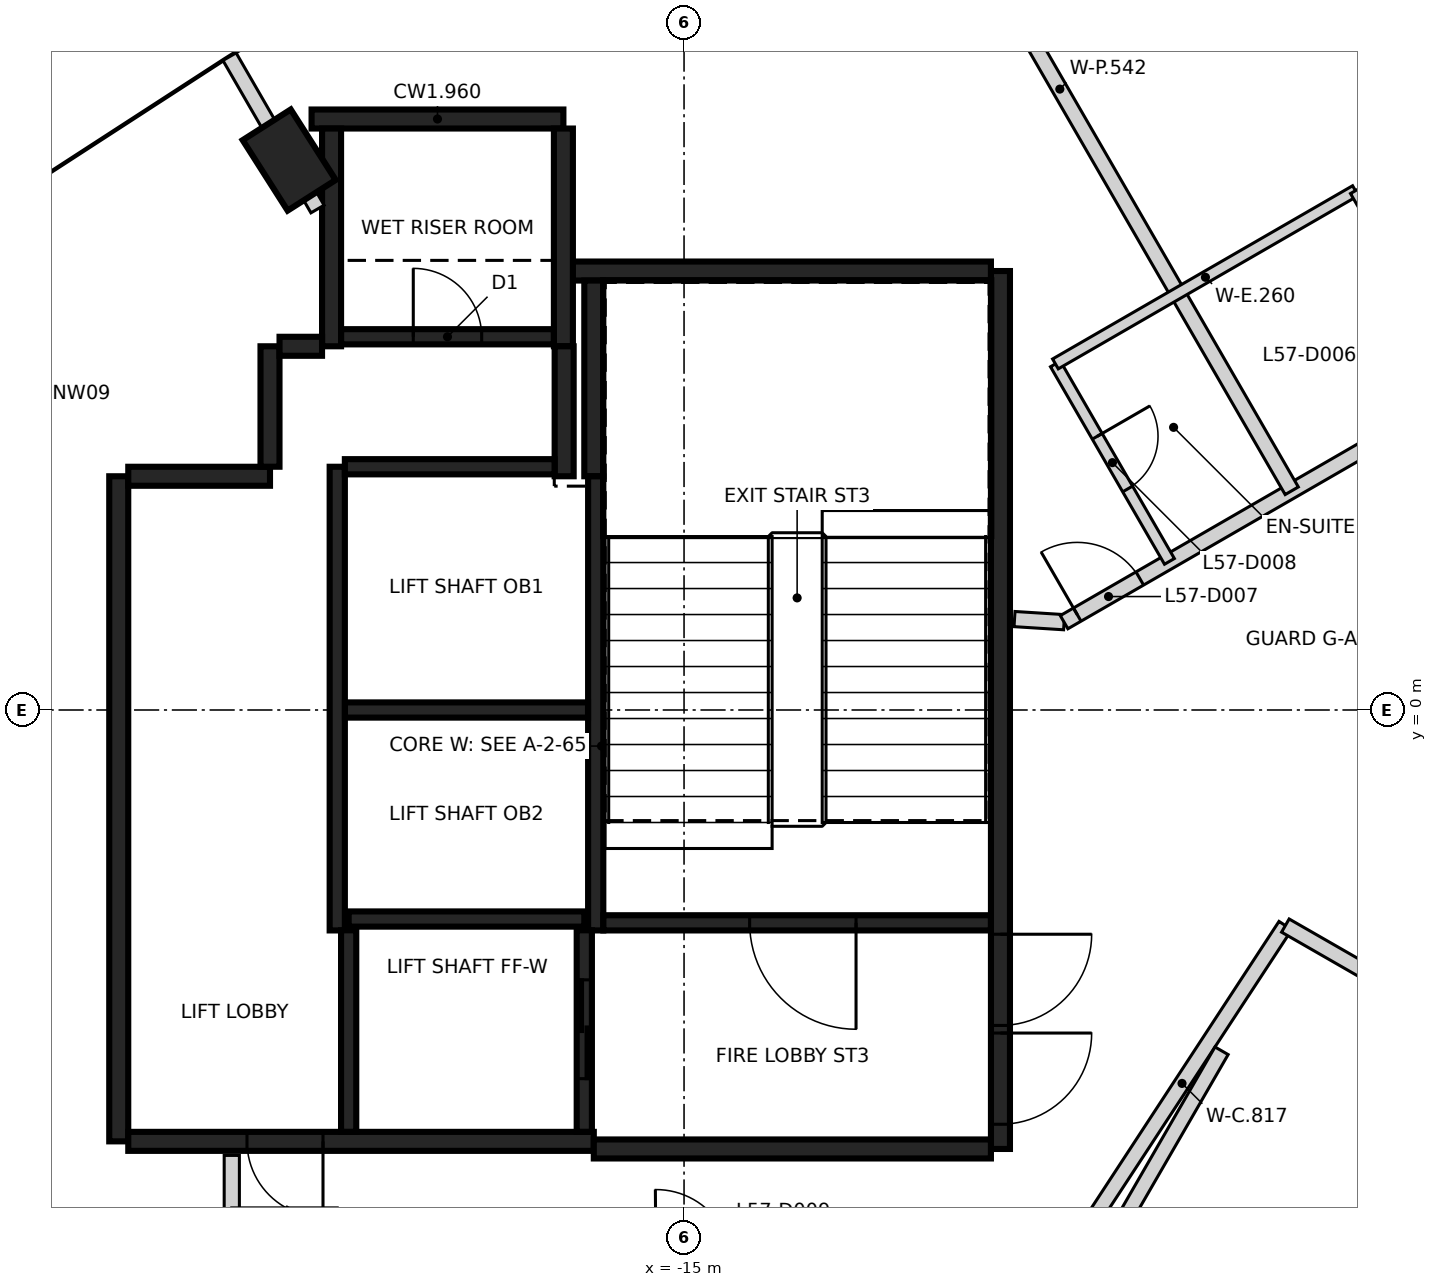
"""IFC4 building model, lengths in metres.
Left out: names, types, materials, properties, quantities, classifications, styles, units other than length and angle.
Written with IfcOpenShell. Run it as: python <this file> out.ifc"""

import sys

from ifc_helpers import new_model, si_unit, direction, frame, frame_2d, origin, origin_2d, place, context, subcontext, project, spatial, rectangle, extrude, element, fill, save


model = new_model("IFC4")
c1 = context("Model", 3, precision=1e-05, world=origin(), true_north=direction((0.0, 1.0)))
c2 = subcontext(c1, "Body", "Model", "MODEL_VIEW")
j1 = project(units=[si_unit("LENGTHUNIT", "METRE"), si_unit("PLANEANGLEUNIT", "RADIAN")], contexts=[c1])
p1 = place(None, origin())
s1 = spatial("IfcSite", under=j1, at=p1, CompositionType="ELEMENT")
p2 = place(p1, origin())
s2 = spatial("IfcBuilding", under=s1, at=p2, CompositionType="ELEMENT")
p3 = place(p2, frame((0.0, 0.0, 228.6)))
s3 = spatial("IfcBuildingStorey", under=s2, at=p3, CompositionType="ELEMENT", Elevation=228.6)
p4 = place(p3, frame((-20.195, 7.235, -0.35), z_axis=(0.0, 0.0, 1.0), x_axis=(-0.537585144719, 0.843209471114, 0.0)))
e1 = element("IfcColumn", 1, at=p4, inside=s3, PredefinedType="COLUMN", context=c2, shape_type="SweptSolid", body=[
    extrude(rectangle(XDim=1.1, YDim=0.75, at=origin_2d()), origin(), (0.0, 0.0, 1.0), 3.6),
])
p5 = place(p3, frame((-10.837, 5.775, 0.0), z_axis=(0.0, 0.0, 1.0), x_axis=(0.0, -1.0, 0.0)))
e2 = element("IfcWall", 2, at=p5, inside=s3, PredefinedType="SHEAR", context=c2, shape_type="SweptSolid", body=[
    extrude(rectangle(XDim=11.55, YDim=0.25, at=frame_2d((5.775, 0.0))), origin(), (0.0, 0.0, 1.0), 3.25),
])
p6 = place(p5, frame((10.025, 0.0, 0.0)))
e3 = element("IfcOpeningElement", 3, at=p6, cuts=e2, PredefinedType="OPENING", context=c2, shape_type="SweptSolid", body=[
    extrude(rectangle(XDim=1.2, YDim=2.1, at=frame_2d((0.6, 1.05))), frame((0.0, 0.135, 0.0), z_axis=(0.0, -1.0, 0.0), x_axis=(1.0, 0.0, 0.0)), (0.0, 0.0, 1.0), 0.27),
])
p7 = place(p5, frame((8.725, 0.0, 0.0)))
e4 = element("IfcOpeningElement", 4, at=p7, cuts=e2, PredefinedType="OPENING", context=c2, shape_type="SweptSolid", body=[
    extrude(rectangle(XDim=1.2, YDim=2.1, at=frame_2d((0.6, 1.05))), frame((0.0, 0.135, 0.0), z_axis=(0.0, -1.0, 0.0), x_axis=(1.0, 0.0, 0.0)), (0.0, 0.0, 1.0), 0.27),
])
p8 = place(p3, frame((-22.437, -5.675, 0.0), z_axis=(0.0, 0.0, 1.0), x_axis=(0.0, 1.0, 0.0)))
e5 = element("IfcWall", 5, at=p8, inside=s3, PredefinedType="SHEAR", context=c2, shape_type="SweptSolid", body=[
    extrude(rectangle(XDim=8.75, YDim=0.25, at=frame_2d((4.375, 0.0))), origin(), (0.0, 0.0, 1.0), 3.25),
])
p9 = place(p3, frame((-16.187, -5.675, 0.0), z_axis=(0.0, 0.0, 1.0), x_axis=(-1.0, 0.0, 0.0)))
e6 = element("IfcWall", 6, at=p9, inside=s3, PredefinedType="SHEAR", context=c2, shape_type="SweptSolid", body=[
    extrude(rectangle(XDim=6.125, YDim=0.25, at=frame_2d((3.062, 0.0))), origin(), (0.0, 0.0, 1.0), 3.25),
])
p10 = place(p9, frame((3.563, 0.0, 0.0)))
e7 = element("IfcOpeningElement", 7, at=p10, cuts=e6, PredefinedType="OPENING", context=c2, shape_type="SweptSolid", body=[
    extrude(rectangle(XDim=1.0, YDim=2.1, at=frame_2d((0.5, 1.05))), frame((0.0, 0.135, 0.0), z_axis=(0.0, -1.0, 0.0), x_axis=(1.0, 0.0, 0.0)), (0.0, 0.0, 1.0), 0.27),
])
p11 = place(p3, frame((-10.963, -5.775, 0.0), z_axis=(0.0, 0.0, 1.0), x_axis=(-1.0, 0.0, 0.0)))
e8 = element("IfcWall", 8, at=p11, inside=s3, PredefinedType="SHEAR", context=c2, shape_type="SweptSolid", body=[
    extrude(rectangle(XDim=5.225, YDim=0.25, at=frame_2d((2.612, 0.0))), origin(), (0.0, 0.0, 1.0), 3.25),
])
p12 = place(p3, frame((-16.472, 5.775, 0.0), z_axis=(0.0, 0.0, 1.0), x_axis=(1.0, 0.0, 0.0)))
e9 = element("IfcWall", 9, at=p12, inside=s3, PredefinedType="SHEAR", context=c2, shape_type="SweptSolid", body=[
    extrude(rectangle(XDim=5.51, YDim=0.25, at=frame_2d((2.755, 0.0))), origin(), (0.0, 0.0, 1.0), 3.25),
])
p13 = place(p3, frame((-19.9, 7.775, 0.0), z_axis=(0.0, 0.0, 1.0), x_axis=(1.0, 0.0, 0.0)))
e10 = element("IfcWall", 10, at=p13, inside=s3, PredefinedType="SHEAR", context=c2, shape_type="SweptSolid", body=[
    extrude(rectangle(XDim=3.313, YDim=0.25, at=frame_2d((1.656, 0.0))), origin(), (0.0, 0.0, 1.0), 3.25),
])
for number, where, z_axis, x_axis in (
    (11, (-16.587, 7.65, 0.0), (0.0, 0.0, 1.0), (0.0, -1.0, 0.0)),
    (12, (-19.637, 4.785, 0.0), (0.0, 0.0, 1.0), (0.0, 1.0, 0.0)),
):
    element("IfcWall", number, at=place(p3, frame(where, z_axis=z_axis, x_axis=x_axis)), inside=s3, PredefinedType="SHEAR", context=c2, shape_type="SweptSolid", body=[
        extrude(rectangle(XDim=2.865, YDim=0.25, at=frame_2d((1.432, 0.0))), origin(), (0.0, 0.0, 1.0), 3.25),
    ])
p14 = place(p3, frame((-16.187, 3.075, 0.0), z_axis=(0.0, 0.0, 1.0), x_axis=(0.0, 1.0, 0.0)))
e13 = element("IfcWall", 13, at=p14, inside=s3, PredefinedType="SHEAR", context=c2, shape_type="SweptSolid", body=[
    extrude(rectangle(XDim=2.575, YDim=0.25, at=frame_2d((1.287, 0.0))), origin(), (0.0, 0.0, 1.0), 3.25),
])
p15 = place(p3, frame((-22.312, 3.075, 0.0), z_axis=(0.0, 0.0, 1.0), x_axis=(1.0, 0.0, 0.0)))
e14 = element("IfcWall", 14, at=p15, inside=s3, PredefinedType="SHEAR", context=c2, shape_type="SweptSolid", body=[
    extrude(rectangle(XDim=1.865, YDim=0.25, at=frame_2d((0.932, 0.0))), origin(), (0.0, 0.0, 1.0), 3.25),
])
p16 = place(p3, frame((-16.577, 4.785, 0.0), z_axis=(0.0, 0.0, 1.0), x_axis=(0.0, -1.0, 0.0)))
e15 = element("IfcWall", 15, at=p16, inside=s3, PredefinedType="SHEAR", context=c2, shape_type="SweptSolid", body=[
    extrude(rectangle(XDim=1.71, YDim=0.25, at=frame_2d((0.855, 0.0))), origin(), (0.0, 0.0, 1.0), 3.25),
])
p17 = place(p3, frame((-20.447, 3.2, 0.0), z_axis=(0.0, 0.0, 1.0), x_axis=(0.0, 1.0, 0.0)))
e16 = element("IfcWall", 16, at=p17, inside=s3, PredefinedType="SHEAR", context=c2, shape_type="SweptSolid", body=[
    extrude(rectangle(XDim=1.584, YDim=0.25, at=frame_2d((0.792, 0.0))), origin(), (0.0, 0.0, 1.0), 3.25),
])
p18 = place(p3, frame((-20.322, 4.785, 0.0), z_axis=(0.0, 0.0, 1.0), x_axis=(1.0, 0.0, 0.0)))
e17 = element("IfcWall", 17, at=p18, inside=s3, PredefinedType="SHEAR", context=c2, shape_type="SweptSolid", body=[
    extrude(rectangle(XDim=0.559, YDim=0.25, at=frame_2d((0.28, 0.0))), origin(), (0.0, 0.0, 1.0), 3.25),
])
p19 = place(p3, frame((-16.162, 3.074, 0.0), z_axis=(0.0, 0.0, 1.0), x_axis=(0.0, -1.0, 0.0)))
e18 = element("IfcWall", 18, at=p19, inside=s3, PredefinedType="SHEAR", context=c2, shape_type="SweptSolid", body=[
    extrude(rectangle(XDim=5.974, YDim=0.2, at=frame_2d((2.987, 0.0))), origin(), (0.0, 0.0, 1.0), 3.25),
])
p20 = place(p3, frame((-19.562, -2.9, 0.0), z_axis=(0.0, 0.0, 1.0), x_axis=(0.0, 1.0, 0.0)))
e19 = element("IfcWall", 19, at=p20, inside=s3, PredefinedType="SHEAR", context=c2, shape_type="SweptSolid", body=[
    extrude(rectangle(XDim=6.1, YDim=0.2, at=frame_2d((3.05, 0.0))), origin(), (0.0, 0.0, 1.0), 3.25),
])
p21 = place(p3, frame((-10.963, -2.8, 0.0), z_axis=(0.0, 0.0, 1.0), x_axis=(-1.0, 0.0, 0.0)))
e20 = element("IfcWall", 20, at=p21, inside=s3, PredefinedType="SHEAR", context=c2, shape_type="SweptSolid", body=[
    extrude(rectangle(XDim=5.098, YDim=0.2, at=frame_2d((2.549, 0.0))), origin(), (0.0, 0.0, 1.0), 3.25),
])
p22 = place(p21, frame((1.774, 0.0, 0.0)))
e21 = element("IfcOpeningElement", 21, at=p22, cuts=e20, PredefinedType="OPENING", context=c2, shape_type="SweptSolid", body=[
    extrude(rectangle(XDim=1.4, YDim=2.1, at=frame_2d((0.7, 1.05))), frame((0.0, 0.11, 0.0), z_axis=(0.0, -1.0, 0.0), x_axis=(1.0, 0.0, 0.0)), (0.0, 0.0, 1.0), 0.22),
])
p23 = place(p3, frame((-16.263, 0.0, 0.0), z_axis=(0.0, 0.0, 1.0), x_axis=(-1.0, 0.0, 0.0)))
e22 = element("IfcWall", 22, at=p23, inside=s3, PredefinedType="SHEAR", context=c2, shape_type="SweptSolid", body=[
    extrude(rectangle(XDim=3.198, YDim=0.2, at=frame_2d((1.599, 0.0))), origin(), (0.0, 0.0, 1.0), 3.25),
])
p24 = place(p3, frame((-19.511, 4.91, 0.0), z_axis=(0.0, 0.0, 1.0), x_axis=(1.0, 0.0, 0.0)))
e23 = element("IfcWall", 23, at=p24, inside=s3, PredefinedType="SHEAR", context=c2, shape_type="SweptSolid", body=[
    extrude(rectangle(XDim=2.798, YDim=0.2, at=frame_2d((1.399, 0.0))), origin(), (0.0, 0.0, 1.0), 3.25),
])
p25 = place(p24, frame((0.949, 0.0, 0.0)))
e24 = element("IfcOpeningElement", 24, at=p25, cuts=e23, PredefinedType="OPENING", context=c2, shape_type="SweptSolid", body=[
    extrude(rectangle(XDim=0.9, YDim=2.1, at=frame_2d((0.45, 1.05))), frame((0.0, 0.11, 0.0), z_axis=(0.0, -1.0, 0.0), x_axis=(1.0, 0.0, 0.0)), (0.0, 0.0, 1.0), 0.22),
])
p26 = place(p3, frame((-19.462, 3.2, 0.0), z_axis=(0.0, 0.0, 1.0), x_axis=(1.0, 0.0, 0.0)))
e25 = element("IfcWall", 25, at=p26, inside=s3, PredefinedType="SHEAR", context=c2, shape_type="SweptSolid", body=[
    extrude(rectangle(XDim=2.759, YDim=0.2, at=frame_2d((1.379, 0.0))), origin(), (0.0, 0.0, 1.0), 3.25),
])
p27 = place(p3, frame((-19.412, -2.75, 0.0), z_axis=(0.0, 0.0, 1.0), x_axis=(1.0, 0.0, 0.0)))
e26 = element("IfcWall", 26, at=p27, inside=s3, PredefinedType="SHEAR", context=c2, shape_type="SweptSolid", body=[
    extrude(rectangle(XDim=3.1, YDim=0.2, at=frame_2d((1.55, 0.0))), origin(), (0.0, 0.0, 1.0), 3.25),
])
p28 = place(p3, frame((-16.312, -2.898, 0.0), z_axis=(0.0, 0.0, 1.0), x_axis=(0.0, -1.0, 0.0)))
e27 = element("IfcWall", 27, at=p28, inside=s3, PredefinedType="SHEAR", context=c2, shape_type="SweptSolid", body=[
    extrude(rectangle(XDim=2.651, YDim=0.2, at=frame_2d((1.325, 0.0))), origin(), (0.0, 0.0, 1.0), 3.25),
])
p29 = place(p28, frame((0.652, 0.0, 0.0)))
e28 = element("IfcOpeningElement", 28, at=p29, cuts=e27, PredefinedType="OPENING", context=c2, shape_type="SweptSolid", body=[
    extrude(rectangle(XDim=1.3, YDim=2.1, at=frame_2d((0.65, 1.05))), frame((0.0, 0.11, 0.0), z_axis=(0.0, -1.0, 0.0), x_axis=(1.0, 0.0, 0.0)), (0.0, 0.0, 1.0), 0.22),
])
p30 = place(p3, frame((-19.412, -5.549, 0.0), z_axis=(0.0, 0.0, 1.0), x_axis=(0.0, 1.0, 0.0)))
e29 = element("IfcWall", 29, at=p30, inside=s3, PredefinedType="SHEAR", context=c2, shape_type="SweptSolid", body=[
    extrude(rectangle(XDim=2.651, YDim=0.2, at=frame_2d((1.325, 0.0))), origin(), (0.0, 0.0, 1.0), 3.25),
])
p31 = place(p3, frame((-20.95, -6.65, 0.0), z_axis=(0.0, 0.0, 1.0), x_axis=(0.0, 1.0, 0.0)))
e30 = element("IfcWall", 30, at=p31, inside=s3, PredefinedType="PARTITIONING", context=c2, shape_type="SweptSolid", body=[
    extrude(rectangle(XDim=0.79, YDim=0.2, at=frame_2d((0.395, 0.0))), origin(), (0.0, 0.0, 1.0), 2.35),
])
p32 = place(p3, frame((-20.95, -6.65, 0.0), z_axis=(0.0, 0.0, 1.0), x_axis=(1.0, 0.0, 0.0)))
e31 = element("IfcWall", 31, at=p32, inside=s3, PredefinedType="PARTITIONING", context=c2, shape_type="SweptSolid", body=[
    extrude(rectangle(XDim=1.387, YDim=0.2, at=frame_2d((0.693, 0.0))), origin(), (0.0, 0.0, 1.0), 2.35),
])
p33 = place(p3, frame((-10.652, 1.196, 0.0), z_axis=(0.0, 0.0, 1.0), x_axis=(0.998005794618, -0.063122372489, 0.0)))
e32 = element("IfcWall", 32, at=p33, inside=s3, PredefinedType="PARTITIONING", context=c2, shape_type="SweptSolid", body=[
    extrude(rectangle(XDim=0.654, YDim=0.2, at=frame_2d((0.327, 0.0))), origin(), (0.0, 0.0, 1.0), 3.25),
])
p34 = place(p3, frame((-10.0, 1.155, 0.0), z_axis=(0.0, 0.0, 1.0), x_axis=(0.866014095592, 0.500019585852, 0.0)))
e33 = element("IfcWall", 33, at=p34, inside=s3, PredefinedType="PARTITIONING", context=c2, shape_type="SweptSolid", body=[
    extrude(rectangle(XDim=12.708, YDim=0.2, at=frame_2d((6.354, 0.0))), origin(), (0.0, 0.0, 1.0), 3.25),
])
p35 = place(p34, frame((6.944, 0.0, 0.0)))
e34 = element("IfcOpeningElement", 34, at=p35, cuts=e33, PredefinedType="OPENING", context=c2, shape_type="SweptSolid", body=[
    extrude(rectangle(XDim=0.95, YDim=2.1, at=frame_2d((0.475, 1.05))), frame((0.0, 0.11, 0.0), z_axis=(0.0, -1.0, 0.0), x_axis=(1.0, 0.0, 0.0)), (0.0, 0.0, 1.0), 0.22),
])
p36 = place(p34, frame((0.2, 0.0, 0.0)))
e35 = element("IfcOpeningElement", 35, at=p36, cuts=e33, PredefinedType="OPENING", context=c2, shape_type="SweptSolid", body=[
    extrude(rectangle(XDim=0.95, YDim=2.1, at=frame_2d((0.475, 1.05))), frame((0.0, 0.11, 0.0), z_axis=(0.0, -1.0, 0.0), x_axis=(1.0, 0.0, 0.0)), (0.0, 0.0, 1.0), 0.22),
])
p37 = place(p3, frame((-9.808, -6.989, 0.0), z_axis=(0.0, 0.0, 1.0), x_axis=(0.547746188785, 0.836644555753, 0.0)))
e36 = element("IfcWall", 36, at=p37, inside=s3, PredefinedType="PARTITIONING", context=c2, shape_type="SweptSolid", body=[
    extrude(rectangle(XDim=4.964, YDim=0.2, at=frame_2d((2.482, 0.0))), origin(), (0.0, 0.0, 1.0), 3.25),
])
p38 = place(p3, frame((-7.089, -2.836, 0.0), z_axis=(0.0, 0.0, 1.0), x_axis=(0.867106243364, -0.498123240493, 0.0)))
e37 = element("IfcWall", 37, at=p38, inside=s3, PredefinedType="PARTITIONING", context=c2, shape_type="SweptSolid", body=[
    extrude(rectangle(XDim=12.804, YDim=0.2, at=frame_2d((6.402, 0.0))), origin(), (0.0, 0.0, 1.0), 3.25),
])
p39 = place(p38, frame((1.909, 0.0, 0.0)))
e38 = element("IfcOpeningElement", 38, at=p39, cuts=e37, PredefinedType="OPENING", context=c2, shape_type="SweptSolid", body=[
    extrude(rectangle(XDim=1.0, YDim=2.1, at=frame_2d((0.5, 1.05))), frame((0.0, 0.11, 0.0), z_axis=(0.0, -1.0, 0.0), x_axis=(1.0, 0.0, 0.0)), (0.0, 0.0, 1.0), 0.22),
])
p40 = place(p38, frame((4.91, 0.0, 0.0)))
e39 = element("IfcOpeningElement", 39, at=p40, cuts=e37, PredefinedType="OPENING", context=c2, shape_type="SweptSolid", body=[
    extrude(rectangle(XDim=0.95, YDim=2.1, at=frame_2d((0.475, 1.05))), frame((0.0, 0.11, 0.0), z_axis=(0.0, -1.0, 0.0), x_axis=(1.0, 0.0, 0.0)), (0.0, 0.0, 1.0), 0.22),
])
p41 = place(p38, frame((11.654, 0.0, 0.0)))
e40 = element("IfcOpeningElement", 40, at=p41, cuts=e37, PredefinedType="OPENING", context=c2, shape_type="SweptSolid", body=[
    extrude(rectangle(XDim=0.95, YDim=2.1, at=frame_2d((0.475, 1.05))), frame((0.0, 0.11, 0.0), z_axis=(0.0, -1.0, 0.0), x_axis=(1.0, 0.0, 0.0)), (0.0, 0.0, 1.0), 0.22),
])
p42 = place(p3, frame((-20.979, 8.595, 0.0), z_axis=(0.0, 0.0, 1.0), x_axis=(0.499950711303, -0.866053858757, 0.0)))
e41 = element("IfcWall", 41, at=p42, inside=s3, PredefinedType="PARTITIONING", context=c2, shape_type="SweptSolid", body=[
    extrude(rectangle(XDim=2.315, YDim=0.2, at=frame_2d((1.157, 0.0))), origin(), (0.0, 0.0, 1.0), 3.25),
])
p43 = place(p3, frame((-13.107, 13.453, 0.0), z_axis=(0.0, 0.0, 1.0), x_axis=(0.500037611077, -0.86600368793, 0.0)))
e42 = element("IfcWall", 42, at=p43, inside=s3, PredefinedType="PARTITIONING", context=c2, shape_type="SweptSolid", body=[
    extrude(rectangle(XDim=12.204, YDim=0.2, at=frame_2d((6.102, 0.0))), origin(), (0.0, 0.0, 1.0), 3.25),
])
p44 = place(p3, frame((-13.107, -13.453, 0.0), z_axis=(0.0, 0.0, 1.0), x_axis=(0.500020349827, 0.866013654488, 0.0)))
e43 = element("IfcWall", 43, at=p44, inside=s3, PredefinedType="PARTITIONING", context=c2, shape_type="SweptSolid", body=[
    extrude(rectangle(XDim=10.357, YDim=0.2, at=frame_2d((5.179, 0.0))), origin(), (0.0, 0.0, 1.0), 3.25),
])
for number, where, z_axis, x_axis in (
    (44, (-9.119, 15.795, 0.0), (0.0, 0.0, 1.0), (0.5, -0.866, 0.0)),
    (45, (-9.119, -15.795, 0.0), (0.0, 0.0, 1.0), (0.5, 0.866, 0.0)),
):
    element("IfcWall", number, at=place(p3, frame(where, z_axis=z_axis, x_axis=x_axis)), inside=s3, PredefinedType="PARTITIONING", context=c2, shape_type="SweptSolid", body=[
        extrude(rectangle(XDim=12.238, YDim=0.2, at=frame_2d((6.119, 0.0))), origin(), (0.0, 0.0, 1.0), 3.25),
    ])
p45 = place(p3, frame((-10.114, 4.553, 0.0), z_axis=(0.0, 0.0, 1.0), x_axis=(0.50002537861, -0.866010750942, 0.0)))
e46 = element("IfcWall", 46, at=p45, inside=s3, PredefinedType="PARTITIONING", context=c2, shape_type="SweptSolid", body=[
    extrude(rectangle(XDim=3.0, YDim=0.15, at=frame_2d((1.5, 0.0))), origin(), (0.0, 0.0, 1.0), 3.25),
])
p46 = place(p45, frame((1.1, 0.0, 0.0)))
e47 = element("IfcOpeningElement", 47, at=p46, cuts=e46, PredefinedType="OPENING", context=c2, shape_type="SweptSolid", body=[
    extrude(rectangle(XDim=0.8, YDim=2.1, at=frame_2d((0.4, 1.05))), frame((0.0, 0.085, 0.0), z_axis=(0.0, -1.0, 0.0), x_axis=(1.0, 0.0, 0.0)), (0.0, 0.0, 1.0), 0.17),
])
p47 = place(p3, frame((-10.114, 4.553, 0.0), z_axis=(0.0, 0.0, 1.0), x_axis=(0.866002713795, 0.500039298155, 0.0)))
e48 = element("IfcWall", 48, at=p47, inside=s3, PredefinedType="PARTITIONING", context=c2, shape_type="SweptSolid", body=[
    extrude(rectangle(XDim=4.558, YDim=0.15, at=frame_2d((2.279, 0.0))), origin(), (0.0, 0.0, 1.0), 3.25),
])
p48 = place(p3, frame((-6.167, 6.832, 0.0), z_axis=(0.0, 0.0, 1.0), x_axis=(0.499990139034, -0.866031096941, 0.0)))
e49 = element("IfcWall", 49, at=p48, inside=s3, PredefinedType="PARTITIONING", context=c2, shape_type="SweptSolid", body=[
    extrude(rectangle(XDim=3.0, YDim=0.15, at=frame_2d((1.5, 0.0))), origin(), (0.0, 0.0, 1.0), 3.25),
])
p49 = place(p48, frame((1.1, 0.0, 0.0)))
e50 = element("IfcOpeningElement", 50, at=p49, cuts=e49, PredefinedType="OPENING", context=c2, shape_type="SweptSolid", body=[
    extrude(rectangle(XDim=0.8, YDim=2.1, at=frame_2d((0.4, 1.05))), frame((0.0, 0.085, 0.0), z_axis=(0.0, -1.0, 0.0), x_axis=(1.0, 0.0, 0.0)), (0.0, 0.0, 1.0), 0.17),
])
p50 = place(p29, origin())
e51 = element("IfcDoor", 51, at=p50, inside=s3, OperationType="SLIDING_TO_LEFT", PredefinedType="DOOR", context=c2, shape_type="SweptSolid", body=[
    extrude(rectangle(XDim=1.3, YDim=2.1, at=frame_2d((0.65, 1.05))), frame((0.0, 0.025, 0.0), z_axis=(0.0, -1.0, 0.0), x_axis=(1.0, 0.0, 0.0)), (0.0, 0.0, 1.0), 0.05),
])
fill(e28, e51)
p51 = place(p10, origin())
e52 = element("IfcDoor", 52, at=p51, inside=s3, OperationType="SINGLE_SWING_LEFT", PredefinedType="DOOR", context=c2, shape_type="SweptSolid", body=[
    extrude(rectangle(XDim=1.0, YDim=2.1, at=frame_2d((0.5, 1.05))), frame((0.0, 0.025, 0.0), z_axis=(0.0, -1.0, 0.0), x_axis=(1.0, 0.0, 0.0)), (0.0, 0.0, 1.0), 0.05),
])
fill(e7, e52)
p52 = place(p6, origin())
e53 = element("IfcDoor", 53, at=p52, inside=s3, OperationType="SINGLE_SWING_LEFT", PredefinedType="DOOR", context=c2, shape_type="SweptSolid", body=[
    extrude(rectangle(XDim=1.2, YDim=2.1, at=frame_2d((0.6, 1.05))), frame((0.0, 0.025, 0.0), z_axis=(0.0, -1.0, 0.0), x_axis=(1.0, 0.0, 0.0)), (0.0, 0.0, 1.0), 0.05),
])
fill(e3, e53)
p53 = place(p7, origin())
e54 = element("IfcDoor", 54, at=p53, inside=s3, OperationType="SINGLE_SWING_RIGHT", PredefinedType="DOOR", context=c2, shape_type="SweptSolid", body=[
    extrude(rectangle(XDim=1.2, YDim=2.1, at=frame_2d((0.6, 1.05))), frame((0.0, 0.025, 0.0), z_axis=(0.0, -1.0, 0.0), x_axis=(1.0, 0.0, 0.0)), (0.0, 0.0, 1.0), 0.05),
])
fill(e4, e54)
p54 = place(p22, origin())
e55 = element("IfcDoor", 55, at=p54, inside=s3, OperationType="SINGLE_SWING_LEFT", PredefinedType="DOOR", context=c2, shape_type="SweptSolid", body=[
    extrude(rectangle(XDim=1.4, YDim=2.1, at=frame_2d((0.7, 1.05))), frame((0.0, 0.025, 0.0), z_axis=(0.0, -1.0, 0.0), x_axis=(1.0, 0.0, 0.0)), (0.0, 0.0, 1.0), 0.05),
])
fill(e21, e55)
p55 = place(p25, origin())
e56 = element("IfcDoor", 56, at=p55, inside=s3, OperationType="SINGLE_SWING_RIGHT", PredefinedType="DOOR", context=c2, shape_type="SweptSolid", body=[
    extrude(rectangle(XDim=0.9, YDim=2.1, at=frame_2d((0.45, 1.05))), frame((0.0, 0.025, 0.0), z_axis=(0.0, -1.0, 0.0), x_axis=(1.0, 0.0, 0.0)), (0.0, 0.0, 1.0), 0.05),
])
fill(e24, e56)
p56 = place(p36, origin())
e57 = element("IfcDoor", 57, at=p56, inside=s3, OperationType="SINGLE_SWING_LEFT", PredefinedType="DOOR", context=c2, shape_type="SweptSolid", body=[
    extrude(rectangle(XDim=0.95, YDim=2.1, at=frame_2d((0.475, 1.05))), frame((0.0, 0.025, 0.0), z_axis=(0.0, -1.0, 0.0), x_axis=(1.0, 0.0, 0.0)), (0.0, 0.0, 1.0), 0.05),
])
fill(e35, e57)
p57 = place(p46, frame((0.8, 0.0, 0.0), z_axis=(0.0, 0.0, 1.0), x_axis=(-1.0, 0.0, 0.0)))
e58 = element("IfcDoor", 58, at=p57, inside=s3, OperationType="SINGLE_SWING_LEFT", PredefinedType="DOOR", context=c2, shape_type="SweptSolid", body=[
    extrude(rectangle(XDim=0.8, YDim=2.1, at=frame_2d((0.4, 1.05))), frame((0.0, 0.025, 0.0), z_axis=(0.0, -1.0, 0.0), x_axis=(1.0, 0.0, 0.0)), (0.0, 0.0, 1.0), 0.05),
])
fill(e47, e58)
save(model, sys.argv[1])
